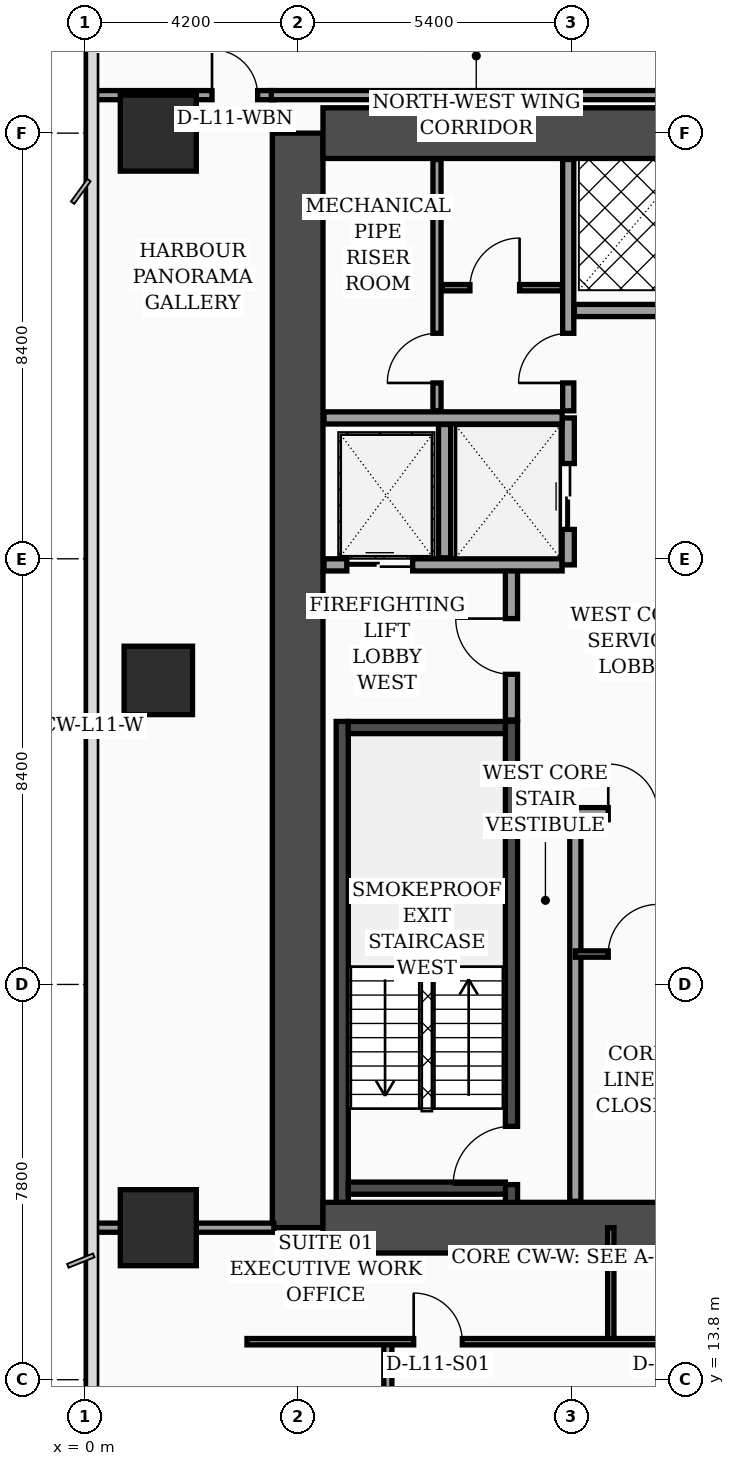
"""IFC4 building model, lengths in metres.
Left out: names, types, materials, properties, quantities, classifications, styles, units other than length and angle.
Written with IfcOpenShell. Run it as: python <this file> out.ifc"""

import sys

from ifc_helpers import new_model, si_unit, direction, frame, frame_2d, origin, origin_2d, place, context, subcontext, project, spatial, rectangle, extrude, element, fill, save


model = new_model("IFC4")
c1 = context("Model", 3, precision=1e-05, world=origin(), true_north=direction((0.0, 1.0)))
c2 = subcontext(c1, "Body", "Model", "MODEL_VIEW")
j1 = project(units=[si_unit("LENGTHUNIT", "METRE"), si_unit("PLANEANGLEUNIT", "RADIAN")], contexts=[c1])
p1 = place(None, origin())
s1 = spatial("IfcSite", under=j1, at=p1, CompositionType="ELEMENT")
p2 = place(p1, origin())
s2 = spatial("IfcBuilding", under=s1, at=p2, CompositionType="ELEMENT")
p3 = place(p2, frame((0.0, 0.0, 50.8)))
s3 = spatial("IfcBuildingStorey", under=s2, at=p3, CompositionType="ELEMENT", Elevation=50.8)
p4 = place(p3, frame((4.2, 16.8, 0.0), z_axis=(0.0, 0.0, 1.0), x_axis=(0.0, 1.0, 0.0)))
e1 = element("IfcWall", 1, at=p4, inside=s3, PredefinedType="SHEAR", context=c2, shape_type="SweptSolid", body=[
    extrude(rectangle(XDim=21.6, YDim=1.0, at=frame_2d((10.8, 0.0))), origin(), (0.0, 0.0, 1.0), 3.56),
])
for number, where, z_axis, x_axis in (
    (2, (4.7, 38.4, 0.0), (0.0, 0.0, 1.0), (1.0, 0.0, 0.0)),
    (3, (4.7, 16.8, 0.0), (0.0, 0.0, 1.0), (1.0, 0.0, 0.0)),
):
    element("IfcWall", number, at=place(p3, frame(where, z_axis=z_axis, x_axis=x_axis)), inside=s3, PredefinedType="SHEAR", context=c2, shape_type="SweptSolid", body=[
        extrude(rectangle(XDim=9.8, YDim=1.0, at=frame_2d((4.9, 0.0))), origin(), (0.0, 0.0, 1.0), 3.56),
    ])
p5 = place(p3, frame((5.08, 17.3, 0.0), z_axis=(0.0, 0.0, 1.0), x_axis=(0.0, 1.0, 0.0)))
e4 = element("IfcWall", 4, at=p5, inside=s3, PredefinedType="SOLIDWALL", context=c2, shape_type="SweptSolid", body=[
    extrude(rectangle(XDim=9.49, YDim=0.24, at=frame_2d((4.745, 0.0))), origin(), (0.0, 0.0, 1.0), 3.56),
])
p6 = place(p3, frame((8.42, 17.3, 0.0), z_axis=(0.0, 0.0, 1.0), x_axis=(0.0, 1.0, 0.0)))
e5 = element("IfcWall", 5, at=p6, inside=s3, PredefinedType="SOLIDWALL", context=c2, shape_type="SweptSolid", body=[
    extrude(rectangle(XDim=9.49, YDim=0.24, at=frame_2d((4.745, 0.0))), origin(), (0.0, 0.0, 1.0), 3.56),
])
p7 = place(p6, frame((0.35, 0.0, 0.0)))
e6 = element("IfcOpeningElement", 6, at=p7, cuts=e5, PredefinedType="OPENING", context=c2, shape_type="SweptSolid", body=[
    extrude(rectangle(XDim=1.15, YDim=2.2, at=frame_2d((0.575, 1.1))), frame((0.0, 0.13, 0.0), z_axis=(0.0, -1.0, 0.0), x_axis=(1.0, 0.0, 0.0)), (0.0, 0.0, 1.0), 0.26),
])
for number, where, z_axis, x_axis in (
    (7, (5.2, 17.58, 0.0), (0.0, 0.0, 1.0), (1.0, 0.0, 0.0)),
    (8, (5.2, 26.67, 0.0), (0.0, 0.0, 1.0), (1.0, 0.0, 0.0)),
):
    element("IfcWall", number, at=place(p3, frame(where, z_axis=z_axis, x_axis=x_axis)), inside=s3, PredefinedType="SOLIDWALL", context=c2, shape_type="SweptSolid", body=[
        extrude(rectangle(XDim=3.1, YDim=0.24, at=frame_2d((1.55, 0.0))), origin(), (0.0, 0.0, 1.0), 3.56),
    ])
p8 = place(p3, frame((1.45, 16.8, 0.0), z_axis=(0.0, 0.0, 1.0), x_axis=(1.0, 0.0, 0.0)))
e9 = element("IfcColumn", 9, at=p8, inside=s3, PredefinedType="COLUMN", context=c2, shape_type="SweptSolid", body=[
    extrude(rectangle(XDim=1.5, YDim=1.5, at=origin_2d()), origin(), (0.0, 0.0, 1.0), 3.56),
])
p9 = place(p3, frame((1.45, 27.6, 0.0), z_axis=(0.0, 0.0, 1.0), x_axis=(1.0, 0.0, 0.0)))
e10 = element("IfcColumn", 10, at=p9, inside=s3, PredefinedType="COLUMN", context=c2, shape_type="SweptSolid", body=[
    extrude(rectangle(XDim=1.35, YDim=1.35, at=origin_2d()), origin(), (0.0, 0.0, 1.0), 3.56),
])
p10 = place(p3, frame((1.45, 38.4, 0.0), z_axis=(0.0, 0.0, 1.0), x_axis=(1.0, 0.0, 0.0)))
e11 = element("IfcColumn", 11, at=p10, inside=s3, PredefinedType="COLUMN", context=c2, shape_type="SweptSolid", body=[
    extrude(rectangle(XDim=1.5, YDim=1.5, at=origin_2d()), origin(), (0.0, 0.0, 1.0), 3.56),
])
p11 = place(p3, frame((8.42, 26.82, 0.0), z_axis=(0.0, 0.0, 1.0), x_axis=(0.0, 1.0, 0.0)))
e12 = element("IfcWall", 12, at=p11, inside=s3, PredefinedType="SOLIDWALL", context=c2, shape_type="SweptSolid", body=[
    extrude(rectangle(XDim=3.0, YDim=0.24, at=frame_2d((1.5, 0.0))), origin(), (0.0, 0.0, 1.0), 3.56),
])
p12 = place(p11, frame((0.9, 0.0, 0.0)))
e13 = element("IfcOpeningElement", 13, at=p12, cuts=e12, PredefinedType="OPENING", context=c2, shape_type="SweptSolid", body=[
    extrude(rectangle(XDim=1.1, YDim=2.2, at=frame_2d((0.55, 1.1))), frame((0.0, 0.13, 0.0), z_axis=(0.0, -1.0, 0.0), x_axis=(1.0, 0.0, 0.0)), (0.0, 0.0, 1.0), 0.26),
])
p13 = place(p3, frame((4.72, 29.88, 0.0), z_axis=(0.0, 0.0, 1.0), x_axis=(1.0, 0.0, 0.0)))
e14 = element("IfcWall", 14, at=p13, inside=s3, PredefinedType="SOLIDWALL", context=c2, shape_type="SweptSolid", body=[
    extrude(rectangle(XDim=4.7, YDim=0.24, at=frame_2d((2.35, 0.0))), origin(), (0.0, 0.0, 1.0), 3.56),
])
p14 = place(p13, frame((0.45, 0.0, 0.0)))
e15 = element("IfcOpeningElement", 15, at=p14, cuts=e14, PredefinedType="OPENING", context=c2, shape_type="SweptSolid", body=[
    extrude(rectangle(XDim=1.3, YDim=2.35, at=frame_2d((0.65, 1.175))), frame((0.0, 0.13, 0.0), z_axis=(0.0, -1.0, 0.0), x_axis=(1.0, 0.0, 0.0)), (0.0, 0.0, 1.0), 0.26),
])
p15 = place(p3, frame((7.1, 30.02, 0.0), z_axis=(0.0, 0.0, 1.0), x_axis=(0.0, 1.0, 0.0)))
e16 = element("IfcWall", 16, at=p15, inside=s3, PredefinedType="SOLIDWALL", context=c2, shape_type="SweptSolid", body=[
    extrude(rectangle(XDim=2.63, YDim=0.24, at=frame_2d((1.315, 0.0))), origin(), (0.0, 0.0, 1.0), 3.56),
])
p16 = place(p3, frame((9.54, 29.88, 0.0), z_axis=(0.0, 0.0, 1.0), x_axis=(0.0, 1.0, 0.0)))
e17 = element("IfcWall", 17, at=p16, inside=s3, PredefinedType="SOLIDWALL", context=c2, shape_type="SweptSolid", body=[
    extrude(rectangle(XDim=2.9, YDim=0.24, at=frame_2d((1.45, 0.0))), origin(), (0.0, 0.0, 1.0), 3.56),
])
p17 = place(p16, frame((0.7, 0.0, 0.0)))
e18 = element("IfcOpeningElement", 18, at=p17, cuts=e17, PredefinedType="OPENING", context=c2, shape_type="SweptSolid", body=[
    extrude(rectangle(XDim=1.3, YDim=2.35, at=frame_2d((0.65, 1.175))), frame((0.0, 0.13, 0.0), z_axis=(0.0, -1.0, 0.0), x_axis=(1.0, 0.0, 0.0)), (0.0, 0.0, 1.0), 0.26),
])
p18 = place(p3, frame((4.72, 32.78, 0.0), z_axis=(0.0, 0.0, 1.0), x_axis=(1.0, 0.0, 0.0)))
e19 = element("IfcWall", 19, at=p18, inside=s3, PredefinedType="SOLIDWALL", context=c2, shape_type="SweptSolid", body=[
    extrude(rectangle(XDim=4.7, YDim=0.24, at=frame_2d((2.35, 0.0))), origin(), (0.0, 0.0, 1.0), 3.56),
])
p19 = place(p3, frame((9.68, 17.32, 0.0), z_axis=(0.0, 0.0, 1.0), x_axis=(0.0, 1.0, 0.0)))
e20 = element("IfcWall", 20, at=p19, inside=s3, PredefinedType="SOLIDWALL", context=c2, shape_type="SweptSolid", body=[
    extrude(rectangle(XDim=7.68, YDim=0.22, at=frame_2d((3.84, 0.0))), origin(), (0.0, 0.0, 1.0), 3.56),
])
p20 = place(p3, frame((6.95, 32.92, 0.0), z_axis=(0.0, 0.0, 1.0), x_axis=(0.0, 1.0, 0.0)))
e21 = element("IfcWall", 21, at=p20, inside=s3, PredefinedType="PARTITIONING", context=c2, shape_type="SweptSolid", body=[
    extrude(rectangle(XDim=4.96, YDim=0.16, at=frame_2d((2.48, 0.0))), origin(), (0.0, 0.0, 1.0), 3.56),
])
p21 = place(p20, frame((0.55, 0.0, 0.0)))
e22 = element("IfcOpeningElement", 22, at=p21, cuts=e21, PredefinedType="OPENING", context=c2, shape_type="SweptSolid", body=[
    extrude(rectangle(XDim=0.98, YDim=2.15, at=frame_2d((0.49, 1.075))), frame((0.0, 0.09, 0.0), z_axis=(0.0, -1.0, 0.0), x_axis=(1.0, 0.0, 0.0)), (0.0, 0.0, 1.0), 0.18),
])
p22 = place(p3, frame((7.05, 35.35, 0.0), z_axis=(0.0, 0.0, 1.0), x_axis=(1.0, 0.0, 0.0)))
e23 = element("IfcWall", 23, at=p22, inside=s3, PredefinedType="PARTITIONING", context=c2, shape_type="SweptSolid", body=[
    extrude(rectangle(XDim=2.37, YDim=0.125, at=frame_2d((1.185, 0.0))), origin(), (0.0, 0.0, 1.0), 3.56),
])
p23 = place(p22, frame((0.55, 0.0, 0.0)))
e24 = element("IfcOpeningElement", 24, at=p23, cuts=e23, PredefinedType="OPENING", context=c2, shape_type="SweptSolid", body=[
    extrude(rectangle(XDim=0.98, YDim=2.15, at=frame_2d((0.49, 1.075))), frame((0.0, 0.073, 0.0), z_axis=(0.0, -1.0, 0.0), x_axis=(1.0, 0.0, 0.0)), (0.0, 0.0, 1.0), 0.145),
])
p24 = place(p3, frame((9.54, 32.92, 0.0), z_axis=(0.0, 0.0, 1.0), x_axis=(0.0, 1.0, 0.0)))
e25 = element("IfcWall", 25, at=p24, inside=s3, PredefinedType="SOLIDWALL", context=c2, shape_type="SweptSolid", body=[
    extrude(rectangle(XDim=4.96, YDim=0.22, at=frame_2d((2.48, 0.0))), origin(), (0.0, 0.0, 1.0), 3.56),
])
p25 = place(p24, frame((0.55, 0.0, 0.0)))
e26 = element("IfcOpeningElement", 26, at=p25, cuts=e25, PredefinedType="OPENING", context=c2, shape_type="SweptSolid", body=[
    extrude(rectangle(XDim=0.98, YDim=2.15, at=frame_2d((0.49, 1.075))), frame((0.0, 0.12, 0.0), z_axis=(0.0, -1.0, 0.0), x_axis=(1.0, 0.0, 0.0)), (0.0, 0.0, 1.0), 0.24),
])
p26 = place(p3, frame((9.68, 22.2, 0.0), z_axis=(0.0, 0.0, 1.0), x_axis=(1.0, 0.0, 0.0)))
e27 = element("IfcWall", 27, at=p26, inside=s3, PredefinedType="PARTITIONING", context=c2, shape_type="SweptSolid", body=[
    extrude(rectangle(XDim=2.47, YDim=0.125, at=frame_2d((1.235, 0.0))), origin(), (0.0, 0.0, 1.0), 3.56),
])
p27 = place(p26, frame((0.65, 0.0, 0.0)))
e28 = element("IfcOpeningElement", 28, at=p27, cuts=e27, PredefinedType="OPENING", context=c2, shape_type="SweptSolid", body=[
    extrude(rectangle(XDim=0.98, YDim=2.15, at=frame_2d((0.49, 1.075))), frame((0.0, 0.073, 0.0), z_axis=(0.0, -1.0, 0.0), x_axis=(1.0, 0.0, 0.0)), (0.0, 0.0, 1.0), 0.145),
])
p28 = place(p3, frame((9.68, 24.97, 0.0), z_axis=(0.0, 0.0, 1.0), x_axis=(1.0, 0.0, 0.0)))
e29 = element("IfcWall", 29, at=p28, inside=s3, PredefinedType="SOLIDWALL", context=c2, shape_type="SweptSolid", body=[
    extrude(rectangle(XDim=2.47, YDim=0.24, at=frame_2d((1.235, 0.0))), origin(), (0.0, 0.0, 1.0), 3.56),
])
p29 = place(p28, frame((0.65, 0.0, 0.0)))
e30 = element("IfcOpeningElement", 30, at=p29, cuts=e29, PredefinedType="OPENING", context=c2, shape_type="SweptSolid", body=[
    extrude(rectangle(XDim=0.98, YDim=2.15, at=frame_2d((0.49, 1.075))), frame((0.0, 0.13, 0.0), z_axis=(0.0, -1.0, 0.0), x_axis=(1.0, 0.0, 0.0)), (0.0, 0.0, 1.0), 0.26),
])
p30 = place(p3, frame((9.66, 34.9, 0.0), z_axis=(0.0, 0.0, 1.0), x_axis=(1.0, 0.0, 0.0)))
e31 = element("IfcWall", 31, at=p30, inside=s3, PredefinedType="SOLIDWALL", context=c2, shape_type="SweptSolid", body=[
    extrude(rectangle(XDim=4.82, YDim=0.24, at=frame_2d((2.41, 0.0))), origin(), (0.0, 0.0, 1.0), 3.56),
])
p31 = place(p3, frame((0.08, 16.8, 0.0), z_axis=(0.0, 0.0, 1.0), x_axis=(1.0, 0.0, 0.0)))
e32 = element("IfcWall", 32, at=p31, inside=s3, PredefinedType="PARTITIONING", context=c2, shape_type="SweptSolid", body=[
    extrude(rectangle(XDim=3.65, YDim=0.18, at=frame_2d((1.825, 0.0))), origin(), (0.0, 0.0, 1.0), 2.84),
])
p32 = place(p3, frame((0.08, 39.15, 0.0), z_axis=(0.0, 0.0, 1.0), x_axis=(1.0, 0.0, 0.0)))
e33 = element("IfcWall", 33, at=p32, inside=s3, PredefinedType="PARTITIONING", context=c2, shape_type="SweptSolid", body=[
    extrude(rectangle(XDim=3.65, YDim=0.18, at=frame_2d((1.825, 0.0))), origin(), (0.0, 0.0, 1.0), 2.84),
])
p33 = place(p32, frame((2.43, 0.0, 0.0)))
e34 = element("IfcOpeningElement", 34, at=p33, cuts=e33, PredefinedType="OPENING", context=c2, shape_type="SweptSolid", body=[
    extrude(rectangle(XDim=0.9, YDim=2.15, at=frame_2d((0.45, 1.075))), frame((0.0, 0.1, 0.0), z_axis=(0.0, -1.0, 0.0), x_axis=(1.0, 0.0, 0.0)), (0.0, 0.0, 1.0), 0.2),
])
p34 = place(p3, frame((10.38, 14.55, 0.0), z_axis=(0.0, 0.0, 1.0), x_axis=(0.0, 1.0, 0.0)))
e35 = element("IfcWall", 35, at=p34, inside=s3, PredefinedType="PARTITIONING", context=c2, shape_type="SweptSolid", body=[
    extrude(rectangle(XDim=2.25, YDim=0.125, at=frame_2d((1.125, 0.0))), origin(), (0.0, 0.0, 1.0), 3.56),
])
p35 = place(p3, frame((5.98, 2.44, 0.0), z_axis=(0.0, 0.0, 1.0), x_axis=(0.0, 1.0, 0.0)))
e36 = element("IfcWall", 36, at=p35, inside=s3, PredefinedType="PARTITIONING", context=c2, shape_type="SweptSolid", body=[
    extrude(rectangle(XDim=12.11, YDim=0.16, at=frame_2d((6.055, 0.0))), origin(), (0.0, 0.0, 1.0), 3.04),
])
p36 = place(p35, frame((5.58, 0.0, 0.0)))
e37 = element("IfcOpeningElement", 37, at=p36, cuts=e36, PredefinedType="OPENING", context=c2, shape_type="SweptSolid", body=[
    extrude(rectangle(XDim=0.96, YDim=2.2, at=frame_2d((0.48, 1.1))), frame((0.0, 0.09, 0.0), z_axis=(0.0, -1.0, 0.0), x_axis=(1.0, 0.0, 0.0)), (0.0, 0.0, 1.0), 0.18),
])
p37 = place(p3, frame((3.2, 14.55, 0.0), z_axis=(0.0, 0.0, 1.0), x_axis=(1.0, 0.0, 0.0)))
e38 = element("IfcWall", 38, at=p37, inside=s3, PredefinedType="PARTITIONING", context=c2, shape_type="SweptSolid", body=[
    extrude(rectangle(XDim=10.1, YDim=0.125, at=frame_2d((5.05, 0.0))), origin(), (0.0, 0.0, 1.0), 2.84),
])
p38 = place(p37, frame((3.29, 0.0, 0.0)))
e39 = element("IfcOpeningElement", 39, at=p38, cuts=e38, PredefinedType="OPENING", context=c2, shape_type="SweptSolid", body=[
    extrude(rectangle(XDim=0.96, YDim=2.2, at=frame_2d((0.48, 1.1))), frame((0.0, 0.073, 0.0), z_axis=(0.0, -1.0, 0.0), x_axis=(1.0, 0.0, 0.0)), (0.0, 0.0, 1.0), 0.145),
])
p39 = place(p37, frame((8.19, 0.0, 0.0)))
e40 = element("IfcOpeningElement", 40, at=p39, cuts=e38, PredefinedType="OPENING", context=c2, shape_type="SweptSolid", body=[
    extrude(rectangle(XDim=0.9, YDim=2.15, at=frame_2d((0.45, 1.075))), frame((0.0, 0.073, 0.0), z_axis=(0.0, -1.0, 0.0), x_axis=(1.0, 0.0, 0.0)), (0.0, 0.0, 1.0), 0.145),
])
p40 = place(p3, frame((3.68, 39.15, 0.0), z_axis=(0.0, 0.0, 1.0), x_axis=(1.0, 0.0, 0.0)))
e41 = element("IfcWall", 41, at=p40, inside=s3, PredefinedType="PARTITIONING", context=c2, shape_type="SweptSolid", body=[
    extrude(rectangle(XDim=11.47, YDim=0.18, at=frame_2d((5.735, 0.0))), origin(), (0.0, 0.0, 1.0), 2.84),
])
p41 = place(p12, origin())
e42 = element("IfcDoor", 42, at=p41, inside=s3, OperationType="SINGLE_SWING_RIGHT", PredefinedType="DOOR", context=c2, shape_type="SweptSolid", body=[
    extrude(rectangle(XDim=1.1, YDim=2.2, at=frame_2d((0.55, 1.1))), frame((0.0, 0.025, 0.0), z_axis=(0.0, -1.0, 0.0), x_axis=(1.0, 0.0, 0.0)), (0.0, 0.0, 1.0), 0.05),
])
fill(e13, e42)
p42 = place(p14, origin())
e43 = element("IfcDoor", 43, at=p42, inside=s3, OperationType="DOUBLE_DOOR_SLIDING", PredefinedType="DOOR", context=c2, shape_type="SweptSolid", body=[
    extrude(rectangle(XDim=1.3, YDim=2.35, at=frame_2d((0.65, 1.175))), frame((0.0, 0.025, 0.0), z_axis=(0.0, -1.0, 0.0), x_axis=(1.0, 0.0, 0.0)), (0.0, 0.0, 1.0), 0.05),
])
fill(e15, e43)
p43 = place(p17, origin())
e44 = element("IfcDoor", 44, at=p43, inside=s3, OperationType="DOUBLE_DOOR_SLIDING", PredefinedType="DOOR", context=c2, shape_type="SweptSolid", body=[
    extrude(rectangle(XDim=1.3, YDim=2.35, at=frame_2d((0.65, 1.175))), frame((0.0, 0.025, 0.0), z_axis=(0.0, -1.0, 0.0), x_axis=(1.0, 0.0, 0.0)), (0.0, 0.0, 1.0), 0.05),
])
fill(e18, e44)
p44 = place(p21, origin())
e45 = element("IfcDoor", 45, at=p44, inside=s3, OperationType="SINGLE_SWING_LEFT", PredefinedType="DOOR", context=c2, shape_type="SweptSolid", body=[
    extrude(rectangle(XDim=0.98, YDim=2.15, at=frame_2d((0.49, 1.075))), frame((0.0, 0.025, 0.0), z_axis=(0.0, -1.0, 0.0), x_axis=(1.0, 0.0, 0.0)), (0.0, 0.0, 1.0), 0.05),
])
fill(e22, e45)
p45 = place(p23, origin())
e46 = element("IfcDoor", 46, at=p45, inside=s3, OperationType="SINGLE_SWING_RIGHT", PredefinedType="DOOR", context=c2, shape_type="SweptSolid", body=[
    extrude(rectangle(XDim=0.98, YDim=2.15, at=frame_2d((0.49, 1.075))), frame((0.0, 0.025, 0.0), z_axis=(0.0, -1.0, 0.0), x_axis=(1.0, 0.0, 0.0)), (0.0, 0.0, 1.0), 0.05),
])
fill(e24, e46)
p46 = place(p25, origin())
e47 = element("IfcDoor", 47, at=p46, inside=s3, OperationType="SINGLE_SWING_LEFT", PredefinedType="DOOR", context=c2, shape_type="SweptSolid", body=[
    extrude(rectangle(XDim=0.98, YDim=2.15, at=frame_2d((0.49, 1.075))), frame((0.0, 0.025, 0.0), z_axis=(0.0, -1.0, 0.0), x_axis=(1.0, 0.0, 0.0)), (0.0, 0.0, 1.0), 0.05),
])
fill(e26, e47)
p47 = place(p27, origin())
e48 = element("IfcDoor", 48, at=p47, inside=s3, OperationType="SINGLE_SWING_RIGHT", PredefinedType="DOOR", context=c2, shape_type="SweptSolid", body=[
    extrude(rectangle(XDim=0.98, YDim=2.15, at=frame_2d((0.49, 1.075))), frame((0.0, 0.025, 0.0), z_axis=(0.0, -1.0, 0.0), x_axis=(1.0, 0.0, 0.0)), (0.0, 0.0, 1.0), 0.05),
])
fill(e28, e48)
p48 = place(p29, origin())
e49 = element("IfcDoor", 49, at=p48, inside=s3, OperationType="SINGLE_SWING_LEFT", PredefinedType="DOOR", context=c2, shape_type="SweptSolid", body=[
    extrude(rectangle(XDim=0.98, YDim=2.15, at=frame_2d((0.49, 1.075))), frame((0.0, 0.025, 0.0), z_axis=(0.0, -1.0, 0.0), x_axis=(1.0, 0.0, 0.0)), (0.0, 0.0, 1.0), 0.05),
])
fill(e30, e49)
p49 = place(p33, origin())
e50 = element("IfcDoor", 50, at=p49, inside=s3, OperationType="SINGLE_SWING_LEFT", PredefinedType="DOOR", context=c2, shape_type="SweptSolid", body=[
    extrude(rectangle(XDim=0.9, YDim=2.15, at=frame_2d((0.45, 1.075))), frame((0.0, 0.025, 0.0), z_axis=(0.0, -1.0, 0.0), x_axis=(1.0, 0.0, 0.0)), (0.0, 0.0, 1.0), 0.05),
])
fill(e34, e50)
p50 = place(p38, origin())
e51 = element("IfcDoor", 51, at=p50, inside=s3, OperationType="SINGLE_SWING_LEFT", PredefinedType="DOOR", context=c2, shape_type="SweptSolid", body=[
    extrude(rectangle(XDim=0.96, YDim=2.2, at=frame_2d((0.48, 1.1))), frame((0.0, 0.025, 0.0), z_axis=(0.0, -1.0, 0.0), x_axis=(1.0, 0.0, 0.0)), (0.0, 0.0, 1.0), 0.05),
])
fill(e39, e51)
p51 = place(p7, origin())
e52 = element("IfcDoor", 52, at=p51, inside=s3, OperationType="SINGLE_SWING_LEFT", PredefinedType="DOOR", context=c2, shape_type="SweptSolid", body=[
    extrude(rectangle(XDim=1.15, YDim=2.2, at=frame_2d((0.575, 1.1))), frame((0.0, 0.025, 0.0), z_axis=(0.0, -1.0, 0.0), x_axis=(1.0, 0.0, 0.0)), (0.0, 0.0, 1.0), 0.05),
])
fill(e6, e52)
save(model, sys.argv[1])
